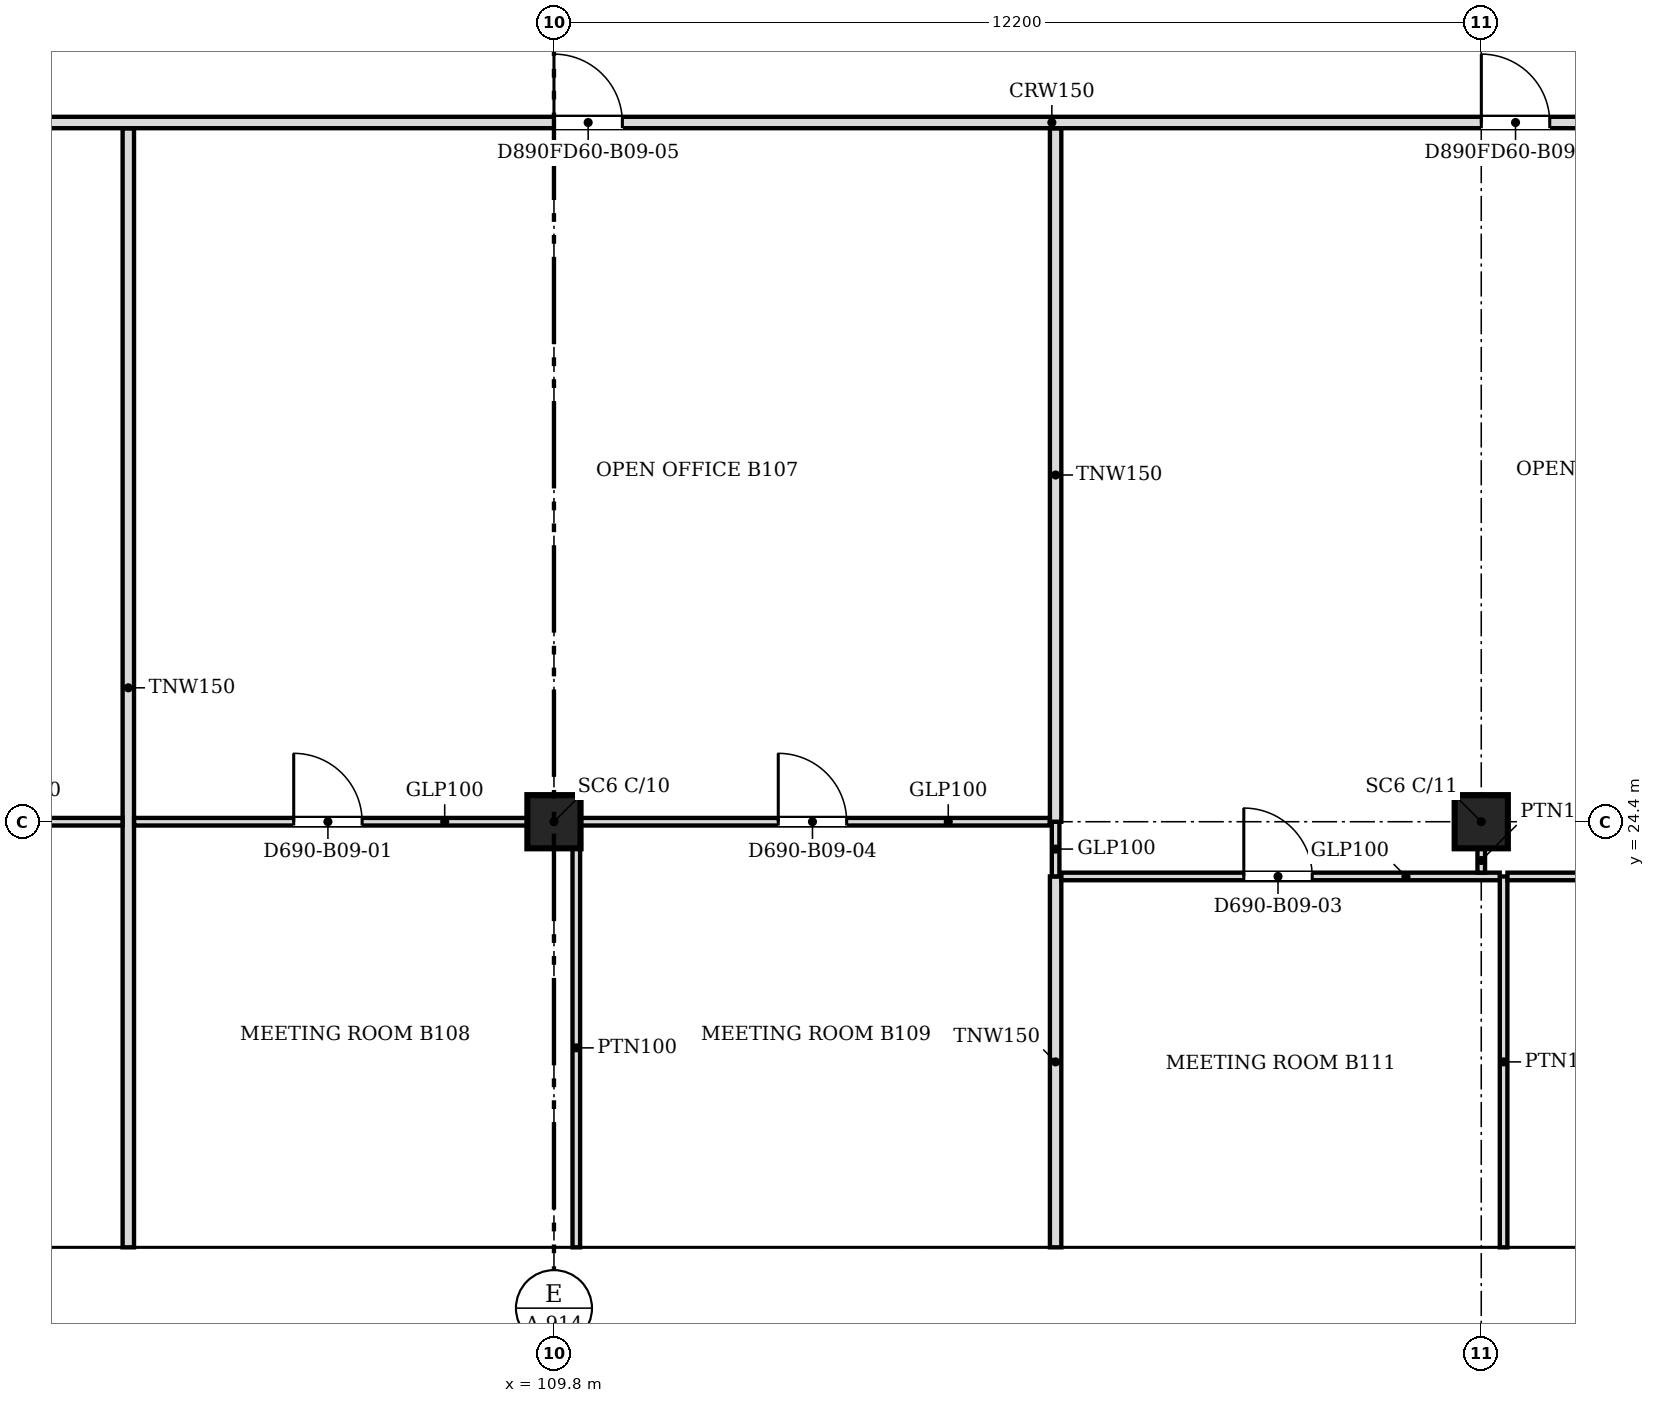
"""IFC4 building model, lengths in metres.
Left out: names, types, materials, properties, quantities, classifications, styles, units other than length and angle.
Written with IfcOpenShell. Run it as: python <this file> out.ifc"""

import sys

from ifc_helpers import new_model, si_unit, direction, frame, frame_2d, origin, origin_2d, place, context, subcontext, project, spatial, polyline, rectangle, outline, extrude, faceted_brep, source, transform, mapped, element, fill, save


model = new_model("IFC4")
c1 = context("Model", 3, precision=1e-05, world=origin(), true_north=direction((0.0, 1.0)))
c2 = subcontext(c1, "Body", "Model", "MODEL_VIEW")
j1 = project(units=[si_unit("LENGTHUNIT", "METRE"), si_unit("PLANEANGLEUNIT", "RADIAN")], contexts=[c1])
p1 = place(None, origin())
s1 = spatial("IfcSite", under=j1, at=p1, CompositionType="ELEMENT")
p2 = place(p1, origin())
s2 = spatial("IfcBuilding", under=s1, at=p2, CompositionType="ELEMENT")
p3 = place(p2, frame((0.0, 0.0, 87.6)))
s3 = spatial("IfcBuildingStorey", under=s2, at=p3, CompositionType="ELEMENT", Elevation=87.6)
for number, where, z_axis, x_axis in (
    (1, (109.8, 24.4, 0.0), (0.0, 0.0, 1.0), (1.0, 0.0, 0.0)),
    (2, (122.0, 24.4, 0.0), (0.0, 0.0, 1.0), (1.0, 0.0, 0.0)),
):
    element("IfcColumn", number, at=place(p3, frame(where, z_axis=z_axis, x_axis=x_axis)), inside=s3, PredefinedType="COLUMN", context=c2, shape_type="SweptSolid", body=[
        extrude(rectangle(XDim=0.7, YDim=0.7, at=origin_2d()), origin(), (0.0, 0.0, 1.0), 3.6),
    ])
m1 = source(origin(), c2, "Body", "Brep", [
    faceted_brep([(3.05, -0.25, 0.0), (6.1, -0.25, 3.8), (6.1, -0.25, 3.8), (3.05, -0.25, 7.6), (0.0, -0.25, 3.8), (0.0, 0.25, 3.8), (3.05, 0.25, 7.6), (6.1, 0.25, 3.8), (6.1, 0.25, 3.8), (3.05, 0.25, 0.0)], [[[0, 1, 2, 3, 4]], [[5, 6, 7, 8, 9]], [[9, 8, 1, 0]], [[7, 6, 3, 2]], [[6, 5, 4, 3]], [[5, 9, 0, 4]], [[1, 8, 7, 2]]]),
])
p4 = place(p3, frame((97.6, 18.55, -3.8), z_axis=(0.0, 0.0, 1.0), x_axis=(1.0, 0.0, 0.0)))
e3 = element("IfcWall", 3, at=p4, inside=s3, PredefinedType="SOLIDWALL", context=c2, shape_type="MappedRepresentation", body=[
    mapped(m1, transform((0.0, 0.0, 0.0), scale=1.0)),
])
m2 = source(origin(), c2, "Body", "SweptSolid", [
    extrude(outline(polyline([(3.05, 0.399), (5.78, 3.8), (3.05, 7.2), (0.321, 3.8), (3.05, 0.399)])), frame((0.0, 0.26, 0.0), z_axis=(0.0, -1.0, 0.0), x_axis=(1.0, 0.0, 0.0)), (0.0, 0.0, 1.0), 0.52),
])
p5 = place(p4, origin())
e4 = element("IfcOpeningElement", 4, at=p5, cuts=e3, PredefinedType="OPENING", context=c2, shape_type="MappedRepresentation", body=[
    mapped(m2, transform((0.0, 0.0, 0.0), scale=1.0)),
])
m3 = source(origin(), c2, "Body", "SweptSolid", [
    extrude(outline(polyline([(3.05, 0.0), (6.1, 3.8), (3.05, 7.6), (0.0, 3.8), (3.05, 0.0)])), frame((0.0, 0.25, 0.0), z_axis=(0.0, -1.0, 0.0), x_axis=(1.0, 0.0, 0.0)), (0.0, 0.0, 1.0), 0.5),
])
p6 = place(p3, frame((103.7, 18.55, -3.8), z_axis=(0.0, 0.0, 1.0), x_axis=(1.0, 0.0, 0.0)))
e5 = element("IfcWall", 5, at=p6, inside=s3, PredefinedType="SOLIDWALL", context=c2, shape_type="MappedRepresentation", body=[
    mapped(m3, transform((0.0, 0.0, 0.0), scale=1.0)),
])
p7 = place(p6, origin())
e6 = element("IfcOpeningElement", 6, at=p7, cuts=e5, PredefinedType="OPENING", context=c2, shape_type="MappedRepresentation", body=[
    mapped(m2, transform((0.0, 0.0, 0.0), scale=1.0)),
])
p8 = place(p3, frame((109.8, 18.55, -3.8), z_axis=(0.0, 0.0, 1.0), x_axis=(1.0, 0.0, 0.0)))
e7 = element("IfcWall", 7, at=p8, inside=s3, PredefinedType="SOLIDWALL", context=c2, shape_type="MappedRepresentation", body=[
    mapped(m1, transform((0.0, 0.0, 0.0), scale=1.0)),
])
p9 = place(p8, origin())
e8 = element("IfcOpeningElement", 8, at=p9, cuts=e7, PredefinedType="OPENING", context=c2, shape_type="MappedRepresentation", body=[
    mapped(m2, transform((0.0, 0.0, 0.0), scale=1.0)),
])
p10 = place(p3, frame((115.9, 18.55, -3.8), z_axis=(0.0, 0.0, 1.0), x_axis=(1.0, 0.0, 0.0)))
e9 = element("IfcWall", 9, at=p10, inside=s3, PredefinedType="SOLIDWALL", context=c2, shape_type="MappedRepresentation", body=[
    mapped(m3, transform((0.0, 0.0, 0.0), scale=1.0)),
])
p11 = place(p10, origin())
e10 = element("IfcOpeningElement", 10, at=p11, cuts=e9, PredefinedType="OPENING", context=c2, shape_type="MappedRepresentation", body=[
    mapped(m2, transform((0.0, 0.0, 0.0), scale=1.0)),
])
m4 = source(origin(), c2, "Body", "Brep", [
    faceted_brep([(3.05, -0.25, 0.0), (6.053, -0.25, 3.8), (3.05, -0.25, 7.6), (0.0, -0.25, 3.8), (0.0, 0.25, 3.8), (3.05, 0.25, 7.6), (6.007, 0.25, 3.859), (6.007, 0.25, 3.741), (3.05, 0.25, 0.0), (6.053, 0.0, 3.8)], [[[0, 1, 2, 3]], [[4, 5, 6, 7, 8]], [[8, 7, 9, 1, 0]], [[6, 5, 2, 1, 9]], [[5, 4, 3, 2]], [[4, 8, 0, 3]], [[7, 6, 9]]]),
])
p12 = place(p3, frame((122.0, 18.55, -3.8), z_axis=(0.0, 0.0, 1.0), x_axis=(1.0, 0.0, 0.0)))
e11 = element("IfcWall", 11, at=p12, inside=s3, PredefinedType="SOLIDWALL", context=c2, shape_type="MappedRepresentation", body=[
    mapped(m4, transform((0.0, 0.0, 0.0), scale=1.0)),
])
m5 = source(origin(), c2, "Body", "SweptSolid", [
    extrude(outline(polyline([(3.049, 0.401), (5.735, 3.8), (3.049, 7.199), (0.321, 3.8), (3.049, 0.401)])), frame((0.0, 0.26, 0.0), z_axis=(0.0, -1.0, 0.0), x_axis=(1.0, 0.0, 0.0)), (0.0, 0.0, 1.0), 0.52),
])
p13 = place(p12, origin())
e12 = element("IfcOpeningElement", 12, at=p13, cuts=e11, PredefinedType="OPENING", context=c2, shape_type="MappedRepresentation", body=[
    mapped(m5, transform((0.0, 0.0, 0.0), scale=1.0)),
])
p14 = place(p2, frame((0.0, 0.0, 91.4)))
s4 = spatial("IfcBuildingStorey", under=s2, at=p14, CompositionType="ELEMENT", Elevation=91.4)
m6 = source(origin(), c2, "Body", "SweptSolid", [
    extrude(outline(polyline([(3.05, 0.0), (6.1, 3.8), (3.05, 7.6), (0.0, 3.8), (3.05, 0.0)])), frame((0.0, 0.25, 0.0), z_axis=(0.0, -1.0, 0.0), x_axis=(1.0, 0.0, 0.0)), (0.0, 0.0, 1.0), 0.5),
])
p15 = place(p14, frame((100.65, 18.55, -3.8), z_axis=(0.0, 0.0, 1.0), x_axis=(1.0, 0.0, 0.0)))
e13 = element("IfcWall", 13, at=p15, inside=s4, PredefinedType="SOLIDWALL", context=c2, shape_type="MappedRepresentation", body=[
    mapped(m6, transform((0.0, 0.0, 0.0), scale=1.0)),
])
m7 = source(origin(), c2, "Body", "SweptSolid", [
    extrude(outline(polyline([(3.05, 0.399), (5.78, 3.8), (3.05, 7.2), (0.321, 3.8), (3.05, 0.399)])), frame((0.0, 0.26, 0.0), z_axis=(0.0, -1.0, 0.0), x_axis=(1.0, 0.0, 0.0)), (0.0, 0.0, 1.0), 0.52),
])
p16 = place(p15, origin())
e14 = element("IfcOpeningElement", 14, at=p16, cuts=e13, PredefinedType="OPENING", context=c2, shape_type="MappedRepresentation", body=[
    mapped(m7, transform((0.0, 0.0, 0.0), scale=1.0)),
])
p17 = place(p14, frame((106.75, 18.55, -3.8), z_axis=(0.0, 0.0, 1.0), x_axis=(1.0, 0.0, 0.0)))
e15 = element("IfcWall", 15, at=p17, inside=s4, PredefinedType="SOLIDWALL", context=c2, shape_type="MappedRepresentation", body=[
    mapped(m6, transform((0.0, 0.0, 0.0), scale=1.0)),
])
p18 = place(p17, origin())
e16 = element("IfcOpeningElement", 16, at=p18, cuts=e15, PredefinedType="OPENING", context=c2, shape_type="MappedRepresentation", body=[
    mapped(m7, transform((0.0, 0.0, 0.0), scale=1.0)),
])
m8 = source(origin(), c2, "Body", "Brep", [
    faceted_brep([(3.05, -0.25, 0.0), (6.1, -0.25, 3.8), (6.1, -0.25, 3.8), (3.05, -0.25, 7.6), (0.0, -0.25, 3.8), (0.0, 0.25, 3.8), (3.05, 0.25, 7.6), (6.1, 0.25, 3.8), (6.1, 0.25, 3.8), (3.05, 0.25, 0.0)], [[[0, 1, 2, 3, 4]], [[5, 6, 7, 8, 9]], [[9, 8, 1, 0]], [[7, 6, 3, 2]], [[6, 5, 4, 3]], [[5, 9, 0, 4]], [[1, 8, 7, 2]]]),
])
p19 = place(p14, frame((112.85, 18.55, -3.8), z_axis=(0.0, 0.0, 1.0), x_axis=(1.0, 0.0, 0.0)))
e17 = element("IfcWall", 17, at=p19, inside=s4, PredefinedType="SOLIDWALL", context=c2, shape_type="MappedRepresentation", body=[
    mapped(m8, transform((0.0, 0.0, 0.0), scale=1.0)),
])
p20 = place(p19, origin())
e18 = element("IfcOpeningElement", 18, at=p20, cuts=e17, PredefinedType="OPENING", context=c2, shape_type="MappedRepresentation", body=[
    mapped(m7, transform((0.0, 0.0, 0.0), scale=1.0)),
])
p21 = place(p14, frame((118.95, 18.55, -3.8), z_axis=(0.0, 0.0, 1.0), x_axis=(1.0, 0.0, 0.0)))
e19 = element("IfcWall", 19, at=p21, inside=s4, PredefinedType="SOLIDWALL", context=c2, shape_type="MappedRepresentation", body=[
    mapped(m6, transform((0.0, 0.0, 0.0), scale=1.0)),
])
p22 = place(p21, origin())
e20 = element("IfcOpeningElement", 20, at=p22, cuts=e19, PredefinedType="OPENING", context=c2, shape_type="MappedRepresentation", body=[
    mapped(m7, transform((0.0, 0.0, 0.0), scale=1.0)),
])
p23 = place(p3, frame((104.2, 18.8, 0.0), z_axis=(0.0, 0.0, 1.0), x_axis=(0.0, 1.0, 0.0)))
e21 = element("IfcWall", 21, at=p23, inside=s3, PredefinedType="PARTITIONING", context=c2, shape_type="SweptSolid", body=[
    extrude(rectangle(XDim=14.724, YDim=0.15, at=frame_2d((7.362, 0.0))), origin(), (0.0, 0.0, 1.0), 3.067),
])
p24 = place(p3, frame((110.094, 18.8, 0.0), z_axis=(0.0, 0.0, 1.0), x_axis=(0.0, 1.0, 0.0)))
e22 = element("IfcWall", 22, at=p24, inside=s3, PredefinedType="PARTITIONING", context=c2, shape_type="SweptSolid", body=[
    extrude(rectangle(XDim=5.249, YDim=0.1, at=frame_2d((2.625, 0.0))), origin(), (0.0, 0.0, 1.0), 3.067),
])
p25 = place(p3, frame((116.4, 18.8, 0.0), z_axis=(0.0, 0.0, 1.0), x_axis=(0.0, 1.0, 0.0)))
e23 = element("IfcWall", 23, at=p25, inside=s3, PredefinedType="PARTITIONING", context=c2, shape_type="SweptSolid", body=[
    extrude(rectangle(XDim=4.88, YDim=0.15, at=frame_2d((2.44, 0.0))), origin(), (0.0, 0.0, 1.0), 3.067),
])
p26 = place(p3, frame((122.294, 18.8, 0.0), z_axis=(0.0, 0.0, 1.0), x_axis=(0.0, 1.0, 0.0)))
e24 = element("IfcWall", 24, at=p26, inside=s3, PredefinedType="PARTITIONING", context=c2, shape_type="SweptSolid", body=[
    extrude(rectangle(XDim=4.88, YDim=0.1, at=frame_2d((2.44, 0.0))), origin(), (0.0, 0.0, 1.0), 3.067),
])
p27 = place(p3, frame((116.4, 23.681, 0.0), z_axis=(0.0, 0.0, 1.0), x_axis=(0.0, 1.0, 0.0)))
e25 = element("IfcWall", 25, at=p27, inside=s3, PredefinedType="PARTITIONING", context=c2, shape_type="SweptSolid", body=[
    extrude(rectangle(XDim=0.718, YDim=0.1, at=frame_2d((0.359, 0.0))), origin(), (0.0, 0.0, 1.0), 3.067),
])
p28 = place(p3, frame((122.243, 23.68, 0.0), z_axis=(0.0, 0.0, 1.0), x_axis=(-1.0, 0.0, 0.0)))
e26 = element("IfcWall", 26, at=p28, inside=s3, PredefinedType="PARTITIONING", context=c2, shape_type="SweptSolid", body=[
    extrude(rectangle(XDim=5.767, YDim=0.1, at=frame_2d((2.883, 0.0))), origin(), (0.0, 0.0, 1.0), 3.067),
])
m9 = source(origin(), c2, "Body", "SweptSolid", [
    extrude(rectangle(XDim=0.9, YDim=2.1, at=frame_2d((0.45, 1.05))), frame((0.0, 0.06, 0.0), z_axis=(0.0, -1.0, 0.0), x_axis=(1.0, 0.0, 0.0)), (0.0, 0.0, 1.0), 0.12),
])
p29 = place(p28, frame((2.467, 0.0, 0.0)))
e27 = element("IfcOpeningElement", 27, at=p29, cuts=e26, PredefinedType="OPENING", context=c2, shape_type="MappedRepresentation", body=[
    mapped(m9, transform((0.0, 0.0, 0.0), scale=1.0)),
])
p30 = place(p3, frame((128.524, 23.68, 0.0), z_axis=(0.0, 0.0, 1.0), x_axis=(-1.0, 0.0, 0.0)))
e28 = element("IfcWall", 28, at=p30, inside=s3, PredefinedType="PARTITIONING", context=c2, shape_type="SweptSolid", body=[
    extrude(rectangle(XDim=6.179, YDim=0.1, at=frame_2d((3.09, 0.0))), origin(), (0.0, 0.0, 1.0), 3.067),
])
p31 = place(p30, frame((2.679, 0.0, 0.0)))
e29 = element("IfcOpeningElement", 29, at=p31, cuts=e28, PredefinedType="OPENING", context=c2, shape_type="MappedRepresentation", body=[
    mapped(m9, transform((0.0, 0.0, 0.0), scale=1.0)),
])
p32 = place(p3, frame((122.0, 24.05, 0.0), z_axis=(0.0, 0.0, 1.0), x_axis=(0.0, -1.0, 0.0)))
e30 = element("IfcWall", 30, at=p32, inside=s3, PredefinedType="PARTITIONING", context=c2, shape_type="SweptSolid", body=[
    extrude(rectangle(XDim=0.32, YDim=0.1, at=frame_2d((0.16, 0.0))), origin(), (0.0, 0.0, 1.0), 3.067),
])
p33 = place(p3, frame((104.124, 24.4, 0.0), z_axis=(0.0, 0.0, 1.0), x_axis=(-1.0, 0.0, 0.0)))
e31 = element("IfcWall", 31, at=p33, inside=s3, PredefinedType="PARTITIONING", context=c2, shape_type="SweptSolid", body=[
    extrude(rectangle(XDim=6.173, YDim=0.1, at=frame_2d((3.086, 0.0))), origin(), (0.0, 0.0, 1.0), 3.067),
])
p34 = place(p33, frame((2.673, 0.0, 0.0)))
e32 = element("IfcOpeningElement", 32, at=p34, cuts=e31, PredefinedType="OPENING", context=c2, shape_type="MappedRepresentation", body=[
    mapped(m9, transform((0.0, 0.0, 0.0), scale=1.0)),
])
p35 = place(p3, frame((109.449, 24.4, 0.0), z_axis=(0.0, 0.0, 1.0), x_axis=(-1.0, 0.0, 0.0)))
e33 = element("IfcWall", 33, at=p35, inside=s3, PredefinedType="PARTITIONING", context=c2, shape_type="SweptSolid", body=[
    extrude(rectangle(XDim=5.173, YDim=0.1, at=frame_2d((2.586, 0.0))), origin(), (0.0, 0.0, 1.0), 3.067),
])
p36 = place(p35, frame((2.173, 0.0, 0.0)))
e34 = element("IfcOpeningElement", 34, at=p36, cuts=e33, PredefinedType="OPENING", context=c2, shape_type="MappedRepresentation", body=[
    mapped(m9, transform((0.0, 0.0, 0.0), scale=1.0)),
])
p37 = place(p3, frame((116.324, 24.4, 0.0), z_axis=(0.0, 0.0, 1.0), x_axis=(-1.0, 0.0, 0.0)))
e35 = element("IfcWall", 35, at=p37, inside=s3, PredefinedType="PARTITIONING", context=c2, shape_type="SweptSolid", body=[
    extrude(rectangle(XDim=6.173, YDim=0.1, at=frame_2d((3.086, 0.0))), origin(), (0.0, 0.0, 1.0), 3.067),
])
p38 = place(p37, frame((2.673, 0.0, 0.0)))
e36 = element("IfcOpeningElement", 36, at=p38, cuts=e35, PredefinedType="OPENING", context=c2, shape_type="MappedRepresentation", body=[
    mapped(m9, transform((0.0, 0.0, 0.0), scale=1.0)),
])
p39 = place(p3, frame((116.4, 24.4, 0.0), z_axis=(0.0, 0.0, 1.0), x_axis=(0.0, 1.0, 0.0)))
e37 = element("IfcWall", 37, at=p39, inside=s3, PredefinedType="PARTITIONING", context=c2, shape_type="SweptSolid", body=[
    extrude(rectangle(XDim=9.124, YDim=0.15, at=frame_2d((4.562, 0.0))), origin(), (0.0, 0.0, 1.0), 3.067),
])
p40 = place(p3, frame((133.7, 33.6, 0.0), z_axis=(0.0, 0.0, 1.0), x_axis=(-1.0, 0.0, 0.0)))
e38 = element("IfcWall", 38, at=p40, inside=s3, PredefinedType="PARTITIONING", context=c2, shape_type="SweptSolid", body=[
    extrude(rectangle(XDim=47.8, YDim=0.15, at=frame_2d((23.9, 0.0))), origin(), (0.0, 0.0, 1.0), 3.067),
])
m10 = source(origin(), c2, "Body", "SweptSolid", [
    extrude(rectangle(XDim=0.9, YDim=2.1, at=frame_2d((0.45, 1.05))), frame((0.0, 0.085, 0.0), z_axis=(0.0, -1.0, 0.0), x_axis=(1.0, 0.0, 0.0)), (0.0, 0.0, 1.0), 0.17),
])
p41 = place(p40, frame((2.099, 0.0, 0.0)))
e39 = element("IfcOpeningElement", 39, at=p41, cuts=e38, PredefinedType="OPENING", context=c2, shape_type="MappedRepresentation", body=[
    mapped(m10, transform((0.0, 0.0, 0.0), scale=1.0)),
])
m11 = source(origin(), c2, "Body", "SweptSolid", [
    extrude(rectangle(XDim=1.0, YDim=2.1, at=frame_2d((0.5, 1.05))), frame((0.0, 0.085, 0.0), z_axis=(0.0, -1.0, 0.0), x_axis=(1.0, 0.0, 0.0)), (0.0, 0.0, 1.0), 0.17),
])
p42 = place(p40, frame((38.399, 0.0, 0.0)))
e40 = element("IfcOpeningElement", 40, at=p42, cuts=e38, PredefinedType="OPENING", context=c2, shape_type="MappedRepresentation", body=[
    mapped(m11, transform((0.0, 0.0, 0.0), scale=1.0)),
])
p43 = place(p40, frame((44.3, 0.0, 0.0)))
e41 = element("IfcOpeningElement", 41, at=p43, cuts=e38, PredefinedType="OPENING", context=c2, shape_type="MappedRepresentation", body=[
    mapped(m10, transform((0.0, 0.0, 0.0), scale=1.0)),
])
p44 = place(p40, frame((32.4, 0.0, 0.0)))
e42 = element("IfcOpeningElement", 42, at=p44, cuts=e38, PredefinedType="OPENING", context=c2, shape_type="MappedRepresentation", body=[
    mapped(m10, transform((0.0, 0.0, 0.0), scale=1.0)),
])
p45 = place(p40, frame((10.799, 0.0, 0.0)))
e43 = element("IfcOpeningElement", 43, at=p45, cuts=e38, PredefinedType="OPENING", context=c2, shape_type="MappedRepresentation", body=[
    mapped(m10, transform((0.0, 0.0, 0.0), scale=1.0)),
])
p46 = place(p40, frame((23.0, 0.0, 0.0)))
e44 = element("IfcOpeningElement", 44, at=p46, cuts=e38, PredefinedType="OPENING", context=c2, shape_type="MappedRepresentation", body=[
    mapped(m10, transform((0.0, 0.0, 0.0), scale=1.0)),
])
m12 = source(origin(), c2, "Body", "SweptSolid", [
    extrude(rectangle(XDim=0.9, YDim=2.1, at=frame_2d((0.45, 1.05))), frame((0.0, 0.025, 0.0), z_axis=(0.0, -1.0, 0.0), x_axis=(1.0, 0.0, 0.0)), (0.0, 0.0, 1.0), 0.05),
])
p47 = place(p36, origin())
e45 = element("IfcDoor", 45, at=p47, inside=s3, OperationType="SINGLE_SWING_RIGHT", PredefinedType="DOOR", context=c2, shape_type="MappedRepresentation", body=[
    mapped(m12, transform((0.0, 0.0, 0.0), scale=1.0)),
])
fill(e34, e45)
p48 = place(p29, origin())
e46 = element("IfcDoor", 46, at=p48, inside=s3, OperationType="SINGLE_SWING_RIGHT", PredefinedType="DOOR", context=c2, shape_type="MappedRepresentation", body=[
    mapped(m12, transform((0.0, 0.0, 0.0), scale=1.0)),
])
fill(e27, e46)
p49 = place(p38, origin())
e47 = element("IfcDoor", 47, at=p49, inside=s3, OperationType="SINGLE_SWING_RIGHT", PredefinedType="DOOR", context=c2, shape_type="MappedRepresentation", body=[
    mapped(m12, transform((0.0, 0.0, 0.0), scale=1.0)),
])
fill(e36, e47)
p50 = place(p45, origin())
e48 = element("IfcDoor", 48, at=p50, inside=s3, OperationType="SINGLE_SWING_RIGHT", PredefinedType="DOOR", context=c2, shape_type="MappedRepresentation", body=[
    mapped(m12, transform((0.0, 0.0, 0.0), scale=1.0)),
])
fill(e43, e48)
p51 = place(p46, origin())
e49 = element("IfcDoor", 49, at=p51, inside=s3, OperationType="SINGLE_SWING_RIGHT", PredefinedType="DOOR", context=c2, shape_type="MappedRepresentation", body=[
    mapped(m12, transform((0.0, 0.0, 0.0), scale=1.0)),
])
fill(e44, e49)
save(model, sys.argv[1])
